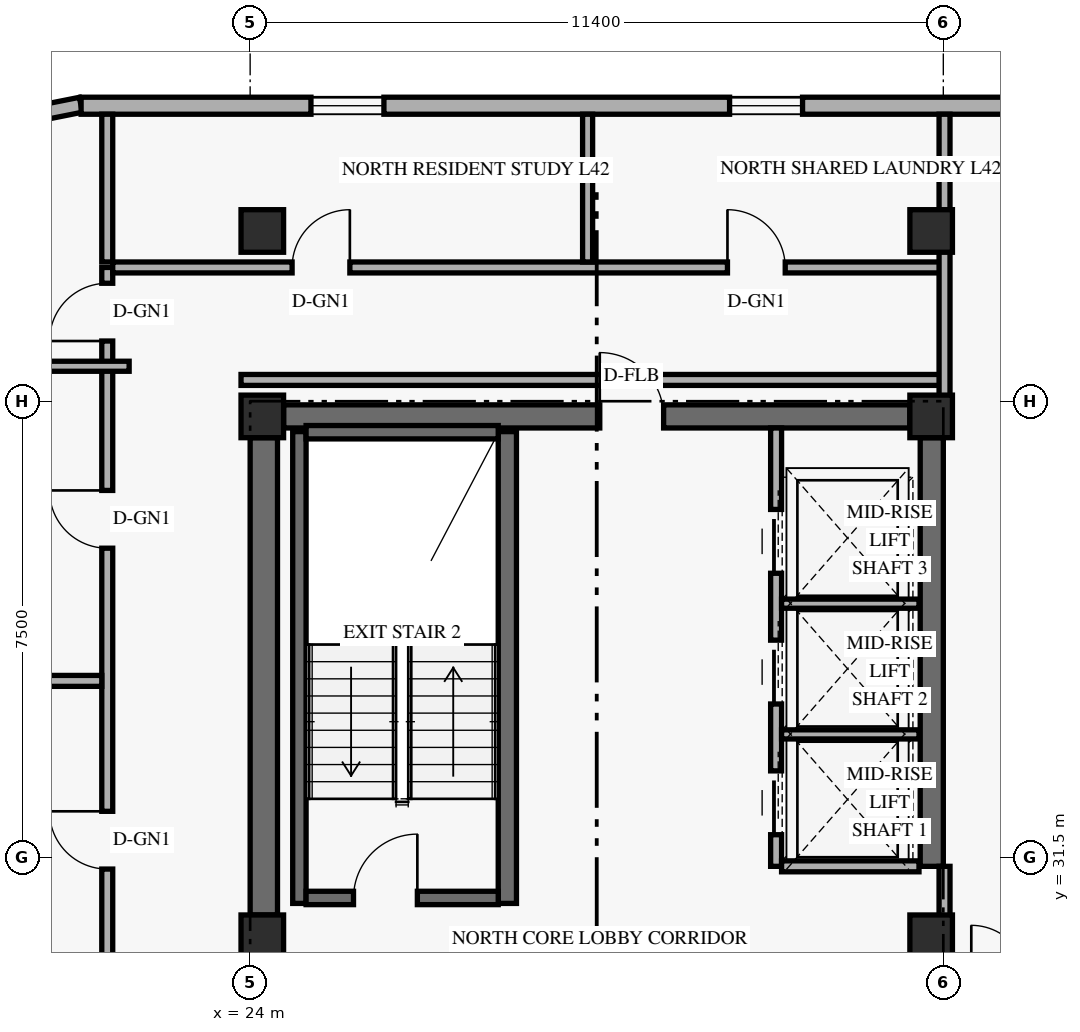
"""IFC4 building model, lengths in metres.
Left out: names, types, materials, properties, quantities, classifications, styles, units other than length and angle.
Written with IfcOpenShell. Run it as: python <this file> out.ifc"""

import sys

from ifc_helpers import new_model, si_unit, direction, frame, frame_2d, origin, origin_2d, place, context, subcontext, project, spatial, rectangle, extrude, element, fill, save


model = new_model("IFC4")
c1 = context("Model", 3, precision=1e-05, world=origin(), true_north=direction((0.0, 1.0)))
c2 = subcontext(c1, "Body", "Model", "MODEL_VIEW")
j1 = project(units=[si_unit("LENGTHUNIT", "METRE"), si_unit("PLANEANGLEUNIT", "RADIAN")], contexts=[c1])
p1 = place(None, origin())
s1 = spatial("IfcSite", under=j1, at=p1, CompositionType="ELEMENT")
p2 = place(p1, origin())
s2 = spatial("IfcBuilding", under=s1, at=p2, CompositionType="ELEMENT")
p3 = place(p2, frame((0.0, 0.0, 162.6)))
s3 = spatial("IfcBuildingStorey", under=s2, at=p3, CompositionType="ELEMENT", Elevation=162.6)
p4 = place(p3, frame((24.225, 30.55, 0.0), z_axis=(0.0, 0.0, 1.0), x_axis=(0.0, 1.0, 0.0)))
e1 = element("IfcWall", 1, at=p4, inside=s3, PredefinedType="SHEAR", context=c2, shape_type="SweptSolid", body=[
    extrude(rectangle(XDim=7.85, YDim=0.45, at=frame_2d((3.925, 0.0))), origin(), (0.0, 0.0, 1.0), 2.748),
])
p5 = place(p3, frame((35.21, 31.35, 0.0), z_axis=(0.0, 0.0, 1.0), x_axis=(0.0, 1.0, 0.0)))
e2 = element("IfcWall", 2, at=p5, inside=s3, PredefinedType="SHEAR", context=c2, shape_type="SweptSolid", body=[
    extrude(rectangle(XDim=7.05, YDim=0.38, at=frame_2d((3.525, 0.0))), origin(), (0.0, 0.0, 1.0), 2.748),
])
p6 = place(p3, frame((24.55, 38.75, 0.0), z_axis=(0.0, 0.0, 1.0), x_axis=(1.0, 0.0, 0.0)))
e3 = element("IfcWall", 3, at=p6, inside=s3, PredefinedType="SHEAR", context=c2, shape_type="SweptSolid", body=[
    extrude(rectangle(XDim=10.3, YDim=0.38, at=frame_2d((5.15, 0.0))), origin(), (0.0, 0.0, 1.0), 3.36),
])
p7 = place(p6, frame((5.2, 0.0, 0.0)))
e4 = element("IfcOpeningElement", 4, at=p7, cuts=e3, PredefinedType="OPENING", context=c2, shape_type="SweptSolid", body=[
    extrude(rectangle(XDim=1.05, YDim=2.15, at=frame_2d((0.525, 1.075))), frame((0.0, 0.2, 0.0), z_axis=(0.0, -1.0, 0.0), x_axis=(1.0, 0.0, 0.0)), (0.0, 0.0, 1.0), 0.4),
])
p8 = place(p3, frame((24.81, 30.74, 0.0), z_axis=(0.0, 0.0, 1.0), x_axis=(0.0, 1.0, 0.0)))
e5 = element("IfcWall", 5, at=p8, inside=s3, PredefinedType="SHEAR", context=c2, shape_type="SweptSolid", body=[
    extrude(rectangle(XDim=7.76, YDim=0.22, at=frame_2d((3.88, 0.0))), origin(), (0.0, 0.0, 1.0), 3.36),
])
p9 = place(p3, frame((28.23, 30.74, 0.0), z_axis=(0.0, 0.0, 1.0), x_axis=(0.0, 1.0, 0.0)))
e6 = element("IfcWall", 6, at=p9, inside=s3, PredefinedType="SHEAR", context=c2, shape_type="SweptSolid", body=[
    extrude(rectangle(XDim=7.76, YDim=0.3, at=frame_2d((3.88, 0.0))), origin(), (0.0, 0.0, 1.0), 3.36),
])
p10 = place(p3, frame((24.92, 30.83, 0.0), z_axis=(0.0, 0.0, 1.0), x_axis=(1.0, 0.0, 0.0)))
e7 = element("IfcWall", 7, at=p10, inside=s3, PredefinedType="SHEAR", context=c2, shape_type="SweptSolid", body=[
    extrude(rectangle(XDim=3.16, YDim=0.22, at=frame_2d((1.58, 0.0))), origin(), (0.0, 0.0, 1.0), 3.36),
])
p11 = place(p10, frame((0.78, 0.0, 0.0)))
e8 = element("IfcOpeningElement", 8, at=p11, cuts=e7, PredefinedType="OPENING", context=c2, shape_type="SweptSolid", body=[
    extrude(rectangle(XDim=1.05, YDim=2.15, at=frame_2d((0.525, 1.075))), frame((0.0, 0.12, 0.0), z_axis=(0.0, -1.0, 0.0), x_axis=(1.0, 0.0, 0.0)), (0.0, 0.0, 1.0), 0.24),
])
p12 = place(p3, frame((24.92, 38.49, 0.0), z_axis=(0.0, 0.0, 1.0), x_axis=(1.0, 0.0, 0.0)))
e9 = element("IfcWall", 9, at=p12, inside=s3, PredefinedType="SHEAR", context=c2, shape_type="SweptSolid", body=[
    extrude(rectangle(XDim=3.16, YDim=0.22, at=frame_2d((1.58, 0.0))), origin(), (0.0, 0.0, 1.0), 3.36),
])
for number, where, z_axis, x_axis in (
    (10, (24.2, 30.2, 0.0), (0.0, 0.0, 1.0), (1.0, 0.0, 0.0)),
    (11, (24.2, 38.75, 0.0), (0.0, 0.0, 1.0), (1.0, 0.0, 0.0)),
    (12, (24.2, 41.8, 0.0), (0.0, 0.0, 1.0), (1.0, 0.0, 0.0)),
    (13, (35.2, 30.2, 0.0), (0.0, 0.0, 1.0), (1.0, 0.0, 0.0)),
    (14, (35.2, 38.75, 0.0), (0.0, 0.0, 1.0), (1.0, 0.0, 0.0)),
    (15, (35.2, 41.8, 0.0), (0.0, 0.0, 1.0), (1.0, 0.0, 0.0)),
):
    element("IfcColumn", number, at=place(p3, frame(where, z_axis=z_axis, x_axis=x_axis)), inside=s3, PredefinedType="COLUMN", context=c2, shape_type="SweptSolid", body=[
        extrude(rectangle(XDim=0.7, YDim=0.7, at=origin_2d()), origin(), (0.0, 0.0, 1.0), 3.6),
    ])
p13 = place(p3, frame((21.217, 43.876, 0.0), z_axis=(0.0, 0.0, 1.0), x_axis=(-0.980809899341, -0.19496651342, 0.0)))
e16 = element("IfcWall", 16, at=p13, inside=s3, PredefinedType="SOLIDWALL", context=c2, shape_type="SweptSolid", body=[
    extrude(rectangle(XDim=1.389, YDim=0.25, at=frame_2d((0.694, 0.0))), origin(), (0.0, 0.0, 1.0), 3.36),
])
p14 = place(p3, frame((54.98, 43.86, 0.0), z_axis=(0.0, 0.0, 1.0), x_axis=(-1.0, 0.0, 0.0)))
e17 = element("IfcWall", 17, at=p14, inside=s3, PredefinedType="SOLIDWALL", context=c2, shape_type="SweptSolid", body=[
    extrude(rectangle(XDim=33.76, YDim=0.28, at=frame_2d((16.88, 0.0))), origin(), (0.0, 0.0, 1.0), 3.36),
])
p15 = place(p14, frame((28.78, 0.0, 0.85)))
e18 = element("IfcOpeningElement", 18, at=p15, cuts=e17, PredefinedType="OPENING", context=c2, shape_type="SweptSolid", body=[
    extrude(rectangle(XDim=1.2, YDim=1.5, at=frame_2d((0.6, 0.75))), frame((0.0, 0.15, 0.0), z_axis=(0.0, -1.0, 0.0), x_axis=(1.0, 0.0, 0.0)), (0.0, 0.0, 1.0), 0.3),
])
p16 = place(p14, frame((21.895, 0.0, 0.85)))
e19 = element("IfcOpeningElement", 19, at=p16, cuts=e17, PredefinedType="OPENING", context=c2, shape_type="SweptSolid", body=[
    extrude(rectangle(XDim=1.2, YDim=1.5, at=frame_2d((0.6, 0.75))), frame((0.0, 0.15, 0.0), z_axis=(0.0, -1.0, 0.0), x_axis=(1.0, 0.0, 0.0)), (0.0, 0.0, 1.0), 0.3),
])
p17 = place(p14, frame((15.221, 0.0, 0.85)))
e20 = element("IfcOpeningElement", 20, at=p17, cuts=e17, PredefinedType="OPENING", context=c2, shape_type="SweptSolid", body=[
    extrude(rectangle(XDim=1.2, YDim=1.5, at=frame_2d((0.6, 0.75))), frame((0.0, 0.15, 0.0), z_axis=(0.0, -1.0, 0.0), x_axis=(1.0, 0.0, 0.0)), (0.0, 0.0, 1.0), 0.3),
])
p18 = place(p14, frame((8.031, 0.0, 0.85)))
e21 = element("IfcOpeningElement", 21, at=p18, cuts=e17, PredefinedType="OPENING", context=c2, shape_type="SweptSolid", body=[
    extrude(rectangle(XDim=1.2, YDim=1.5, at=frame_2d((0.6, 0.75))), frame((0.0, 0.15, 0.0), z_axis=(0.0, -1.0, 0.0), x_axis=(1.0, 0.0, 0.0)), (0.0, 0.0, 1.0), 0.3),
])
p19 = place(p14, frame((1.99, 0.0, 0.85)))
e22 = element("IfcOpeningElement", 22, at=p19, cuts=e17, PredefinedType="OPENING", context=c2, shape_type="SweptSolid", body=[
    extrude(rectangle(XDim=1.2, YDim=1.5, at=frame_2d((0.6, 0.75))), frame((0.0, 0.15, 0.0), z_axis=(0.0, -1.0, 0.0), x_axis=(1.0, 0.0, 0.0)), (0.0, 0.0, 1.0), 0.3),
])
p20 = place(p3, frame((32.65, 31.35, 0.0), z_axis=(0.0, 0.0, 1.0), x_axis=(0.0, 1.0, 0.0)))
e23 = element("IfcWall", 23, at=p20, inside=s3, PredefinedType="STANDARD", context=c2, shape_type="SweptSolid", body=[
    extrude(rectangle(XDim=7.21, YDim=0.18, at=frame_2d((3.605, 0.0))), origin(), (0.0, 0.0, 1.0), 3.36),
])
p21 = place(p20, frame((0.52, 0.0, 0.0)))
e24 = element("IfcOpeningElement", 24, at=p21, cuts=e23, PredefinedType="OPENING", context=c2, shape_type="SweptSolid", body=[
    extrude(rectangle(XDim=1.05, YDim=2.2, at=frame_2d((0.525, 1.1))), frame((0.0, 0.1, 0.0), z_axis=(0.0, -1.0, 0.0), x_axis=(1.0, 0.0, 0.0)), (0.0, 0.0, 1.0), 0.2),
])
p22 = place(p20, frame((2.67, 0.0, 0.0)))
e25 = element("IfcOpeningElement", 25, at=p22, cuts=e23, PredefinedType="OPENING", context=c2, shape_type="SweptSolid", body=[
    extrude(rectangle(XDim=1.05, YDim=2.2, at=frame_2d((0.525, 1.1))), frame((0.0, 0.1, 0.0), z_axis=(0.0, -1.0, 0.0), x_axis=(1.0, 0.0, 0.0)), (0.0, 0.0, 1.0), 0.2),
])
p23 = place(p20, frame((4.82, 0.0, 0.0)))
e26 = element("IfcOpeningElement", 26, at=p23, cuts=e23, PredefinedType="OPENING", context=c2, shape_type="SweptSolid", body=[
    extrude(rectangle(XDim=1.05, YDim=2.2, at=frame_2d((0.525, 1.1))), frame((0.0, 0.1, 0.0), z_axis=(0.0, -1.0, 0.0), x_axis=(1.0, 0.0, 0.0)), (0.0, 0.0, 1.0), 0.2),
])
p24 = place(p3, frame((32.74, 31.35, 0.0), z_axis=(0.0, 0.0, 1.0), x_axis=(1.0, 0.0, 0.0)))
e27 = element("IfcWall", 27, at=p24, inside=s3, PredefinedType="STANDARD", context=c2, shape_type="SweptSolid", body=[
    extrude(rectangle(XDim=2.26, YDim=0.18, at=frame_2d((1.13, 0.0))), origin(), (0.0, 0.0, 1.0), 3.36),
])
for number, where, z_axis, x_axis in (
    (28, (32.74, 33.52, 0.0), (0.0, 0.0, 1.0), (1.0, 0.0, 0.0)),
    (29, (32.74, 35.67, 0.0), (0.0, 0.0, 1.0), (1.0, 0.0, 0.0)),
):
    element("IfcWall", number, at=place(p3, frame(where, z_axis=z_axis, x_axis=x_axis)), inside=s3, PredefinedType="STANDARD", context=c2, shape_type="SweptSolid", body=[
        extrude(rectangle(XDim=2.26, YDim=0.15, at=frame_2d((1.13, 0.0))), origin(), (0.0, 0.0, 1.0), 3.36),
    ])
p25 = place(p3, frame((35.42, 29.46, 0.0), z_axis=(0.0, 0.0, 1.0), x_axis=(0.0, 1.0, 0.0)))
e30 = element("IfcWall", 30, at=p25, inside=s3, PredefinedType="STANDARD", context=c2, shape_type="SweptSolid", body=[
    extrude(rectangle(XDim=1.89, YDim=0.18, at=frame_2d((0.945, 0.0))), origin(), (0.0, 0.0, 1.0), 2.73),
])
p26 = place(p3, frame((21.65, 6.8, 0.0), z_axis=(0.0, 0.0, 1.0), x_axis=(0.0, 1.0, 0.0)))
e31 = element("IfcWall", 31, at=p26, inside=s3, PredefinedType="STANDARD", context=c2, shape_type="SweptSolid", body=[
    extrude(rectangle(XDim=34.4, YDim=0.18, at=frame_2d((17.2, 0.0))), origin(), (0.0, 0.0, 1.0), 2.73),
])
p27 = place(p26, frame((0.3, 0.0, 0.0)))
e32 = element("IfcOpeningElement", 32, at=p27, cuts=e31, PredefinedType="OPENING", context=c2, shape_type="SweptSolid", body=[
    extrude(rectangle(XDim=0.95, YDim=2.15, at=frame_2d((0.475, 1.075))), frame((0.0, 0.1, 0.0), z_axis=(0.0, -1.0, 0.0), x_axis=(1.0, 0.0, 0.0)), (0.0, 0.0, 1.0), 0.2),
])
p28 = place(p26, frame((4.167, 0.0, 0.0)))
e33 = element("IfcOpeningElement", 33, at=p28, cuts=e31, PredefinedType="OPENING", context=c2, shape_type="SweptSolid", body=[
    extrude(rectangle(XDim=0.95, YDim=2.15, at=frame_2d((0.475, 1.075))), frame((0.0, 0.1, 0.0), z_axis=(0.0, -1.0, 0.0), x_axis=(1.0, 0.0, 0.0)), (0.0, 0.0, 1.0), 0.2),
])
p29 = place(p26, frame((8.77, 0.0, 0.0)))
e34 = element("IfcOpeningElement", 34, at=p29, cuts=e31, PredefinedType="OPENING", context=c2, shape_type="SweptSolid", body=[
    extrude(rectangle(XDim=0.95, YDim=2.15, at=frame_2d((0.475, 1.075))), frame((0.0, 0.1, 0.0), z_axis=(0.0, -1.0, 0.0), x_axis=(1.0, 0.0, 0.0)), (0.0, 0.0, 1.0), 0.2),
])
p30 = place(p26, frame((13.88, 0.0, 0.0)))
e35 = element("IfcOpeningElement", 35, at=p30, cuts=e31, PredefinedType="OPENING", context=c2, shape_type="SweptSolid", body=[
    extrude(rectangle(XDim=0.95, YDim=2.15, at=frame_2d((0.475, 1.075))), frame((0.0, 0.1, 0.0), z_axis=(0.0, -1.0, 0.0), x_axis=(1.0, 0.0, 0.0)), (0.0, 0.0, 1.0), 0.2),
])
p31 = place(p26, frame((19.395, 0.0, 0.0)))
e36 = element("IfcOpeningElement", 36, at=p31, cuts=e31, PredefinedType="OPENING", context=c2, shape_type="SweptSolid", body=[
    extrude(rectangle(XDim=0.95, YDim=2.15, at=frame_2d((0.475, 1.075))), frame((0.0, 0.1, 0.0), z_axis=(0.0, -1.0, 0.0), x_axis=(1.0, 0.0, 0.0)), (0.0, 0.0, 1.0), 0.2),
])
p32 = place(p26, frame((24.505, 0.0, 0.0)))
e37 = element("IfcOpeningElement", 37, at=p32, cuts=e31, PredefinedType="OPENING", context=c2, shape_type="SweptSolid", body=[
    extrude(rectangle(XDim=0.95, YDim=2.15, at=frame_2d((0.475, 1.075))), frame((0.0, 0.1, 0.0), z_axis=(0.0, -1.0, 0.0), x_axis=(1.0, 0.0, 0.0)), (0.0, 0.0, 1.0), 0.2),
])
p33 = place(p26, frame((29.782, 0.0, 0.0)))
e38 = element("IfcOpeningElement", 38, at=p33, cuts=e31, PredefinedType="OPENING", context=c2, shape_type="SweptSolid", body=[
    extrude(rectangle(XDim=0.95, YDim=2.15, at=frame_2d((0.475, 1.075))), frame((0.0, 0.1, 0.0), z_axis=(0.0, -1.0, 0.0), x_axis=(1.0, 0.0, 0.0)), (0.0, 0.0, 1.0), 0.2),
])
p34 = place(p26, frame((33.19, 0.0, 0.0)))
e39 = element("IfcOpeningElement", 39, at=p34, cuts=e31, PredefinedType="OPENING", context=c2, shape_type="SweptSolid", body=[
    extrude(rectangle(XDim=0.95, YDim=2.15, at=frame_2d((0.475, 1.075))), frame((0.0, 0.1, 0.0), z_axis=(0.0, -1.0, 0.0), x_axis=(1.0, 0.0, 0.0)), (0.0, 0.0, 1.0), 0.2),
])
p35 = place(p3, frame((21.74, 41.2, 0.0), z_axis=(0.0, 0.0, 1.0), x_axis=(1.0, 0.0, 0.0)))
e40 = element("IfcWall", 40, at=p35, inside=s3, PredefinedType="STANDARD", context=c2, shape_type="SweptSolid", body=[
    extrude(rectangle(XDim=13.68, YDim=0.18, at=frame_2d((6.84, 0.0))), origin(), (0.0, 0.0, 1.0), 2.73),
])
p36 = place(p35, frame((2.95, 0.0, 0.0)))
e41 = element("IfcOpeningElement", 41, at=p36, cuts=e40, PredefinedType="OPENING", context=c2, shape_type="SweptSolid", body=[
    extrude(rectangle(XDim=0.95, YDim=2.15, at=frame_2d((0.475, 1.075))), frame((0.0, 0.1, 0.0), z_axis=(0.0, -1.0, 0.0), x_axis=(1.0, 0.0, 0.0)), (0.0, 0.0, 1.0), 0.2),
])
p37 = place(p35, frame((10.11, 0.0, 0.0)))
e42 = element("IfcOpeningElement", 42, at=p37, cuts=e40, PredefinedType="OPENING", context=c2, shape_type="SweptSolid", body=[
    extrude(rectangle(XDim=0.95, YDim=2.15, at=frame_2d((0.475, 1.075))), frame((0.0, 0.1, 0.0), z_axis=(0.0, -1.0, 0.0), x_axis=(1.0, 0.0, 0.0)), (0.0, 0.0, 1.0), 0.2),
])
p38 = place(p3, frame((23.85, 39.35, 0.0), z_axis=(0.0, 0.0, 1.0), x_axis=(1.0, 0.0, 0.0)))
e43 = element("IfcWall", 43, at=p38, inside=s3, PredefinedType="STANDARD", context=c2, shape_type="SweptSolid", body=[
    extrude(rectangle(XDim=11.57, YDim=0.18, at=frame_2d((5.785, 0.0))), origin(), (0.0, 0.0, 1.0), 2.73),
])
p39 = place(p3, frame((21.65, 41.29, 0.0), z_axis=(0.0, 0.0, 1.0), x_axis=(0.0, 1.0, 0.0)))
e44 = element("IfcWall", 44, at=p39, inside=s3, PredefinedType="PARTITIONING", context=c2, shape_type="SweptSolid", body=[
    extrude(rectangle(XDim=2.43, YDim=0.18, at=frame_2d((1.215, 0.0))), origin(), (0.0, 0.0, 1.0), 2.879),
])
p40 = place(p3, frame((35.42, 38.75, 0.0), z_axis=(0.0, 0.0, 1.0), x_axis=(0.0, 1.0, 0.0)))
e45 = element("IfcWall", 45, at=p40, inside=s3, PredefinedType="PARTITIONING", context=c2, shape_type="SweptSolid", body=[
    extrude(rectangle(XDim=4.97, YDim=0.18, at=frame_2d((2.485, 0.0))), origin(), (0.0, 0.0, 1.0), 2.73),
])
p41 = place(p3, frame((17.88, 34.4, 0.0), z_axis=(0.0, 0.0, 1.0), x_axis=(1.0, 0.0, 0.0)))
e46 = element("IfcWall", 46, at=p41, inside=s3, PredefinedType="PARTITIONING", context=c2, shape_type="SweptSolid", body=[
    extrude(rectangle(XDim=3.68, YDim=0.18, at=frame_2d((1.84, 0.0))), origin(), (0.0, 0.0, 1.0), 2.879),
])
p42 = place(p3, frame((17.88, 39.575, 0.0), z_axis=(0.0, 0.0, 1.0), x_axis=(1.0, 0.0, 0.0)))
e47 = element("IfcWall", 47, at=p42, inside=s3, PredefinedType="PARTITIONING", context=c2, shape_type="SweptSolid", body=[
    extrude(rectangle(XDim=4.13, YDim=0.165, at=frame_2d((2.065, 0.0))), origin(), (0.0, 0.0, 1.0), 2.879),
])
p43 = place(p3, frame((29.55, 41.29, 0.0), z_axis=(0.0, 0.0, 1.0), x_axis=(0.0, 1.0, 0.0)))
e48 = element("IfcWall", 48, at=p43, inside=s3, PredefinedType="PARTITIONING", context=c2, shape_type="SweptSolid", body=[
    extrude(rectangle(XDim=2.43, YDim=0.165, at=frame_2d((1.215, 0.0))), origin(), (0.0, 0.0, 1.0), 2.879),
])
p44 = place(p15, origin())
e49 = element("IfcWindow", 49, at=p44, inside=s3, PartitioningType="SINGLE_PANEL", PredefinedType="WINDOW", context=c2, shape_type="SweptSolid", body=[
    extrude(rectangle(XDim=1.2, YDim=1.5, at=frame_2d((0.6, 0.75))), frame((0.0, 0.03, 0.0), z_axis=(0.0, -1.0, 0.0), x_axis=(1.0, 0.0, 0.0)), (0.0, 0.0, 1.0), 0.06),
])
fill(e18, e49)
p45 = place(p16, origin())
e50 = element("IfcWindow", 50, at=p45, inside=s3, PartitioningType="SINGLE_PANEL", PredefinedType="WINDOW", context=c2, shape_type="SweptSolid", body=[
    extrude(rectangle(XDim=1.2, YDim=1.5, at=frame_2d((0.6, 0.75))), frame((0.0, 0.03, 0.0), z_axis=(0.0, -1.0, 0.0), x_axis=(1.0, 0.0, 0.0)), (0.0, 0.0, 1.0), 0.06),
])
fill(e19, e50)
p46 = place(p11, origin())
e51 = element("IfcDoor", 51, at=p46, inside=s3, OperationType="SINGLE_SWING_RIGHT", PredefinedType="DOOR", context=c2, shape_type="SweptSolid", body=[
    extrude(rectangle(XDim=1.05, YDim=2.15, at=frame_2d((0.525, 1.075))), frame((0.0, 0.025, 0.0), z_axis=(0.0, -1.0, 0.0), x_axis=(1.0, 0.0, 0.0)), (0.0, 0.0, 1.0), 0.05),
])
fill(e8, e51)
p47 = place(p21, origin())
e52 = element("IfcDoor", 52, at=p47, inside=s3, OperationType="SLIDING_TO_LEFT", PredefinedType="DOOR", context=c2, shape_type="SweptSolid", body=[
    extrude(rectangle(XDim=1.05, YDim=2.2, at=frame_2d((0.525, 1.1))), frame((0.0, 0.025, 0.0), z_axis=(0.0, -1.0, 0.0), x_axis=(1.0, 0.0, 0.0)), (0.0, 0.0, 1.0), 0.05),
])
fill(e24, e52)
p48 = place(p22, origin())
e53 = element("IfcDoor", 53, at=p48, inside=s3, OperationType="SLIDING_TO_LEFT", PredefinedType="DOOR", context=c2, shape_type="SweptSolid", body=[
    extrude(rectangle(XDim=1.05, YDim=2.2, at=frame_2d((0.525, 1.1))), frame((0.0, 0.025, 0.0), z_axis=(0.0, -1.0, 0.0), x_axis=(1.0, 0.0, 0.0)), (0.0, 0.0, 1.0), 0.05),
])
fill(e25, e53)
p49 = place(p23, origin())
e54 = element("IfcDoor", 54, at=p49, inside=s3, OperationType="SLIDING_TO_LEFT", PredefinedType="DOOR", context=c2, shape_type="SweptSolid", body=[
    extrude(rectangle(XDim=1.05, YDim=2.2, at=frame_2d((0.525, 1.1))), frame((0.0, 0.025, 0.0), z_axis=(0.0, -1.0, 0.0), x_axis=(1.0, 0.0, 0.0)), (0.0, 0.0, 1.0), 0.05),
])
fill(e26, e54)
p50 = place(p7, frame((1.05, 0.0, 0.0), z_axis=(0.0, 0.0, 1.0), x_axis=(-1.0, 0.0, 0.0)))
e55 = element("IfcDoor", 55, at=p50, inside=s3, OperationType="SINGLE_SWING_RIGHT", PredefinedType="DOOR", context=c2, shape_type="SweptSolid", body=[
    extrude(rectangle(XDim=1.05, YDim=2.15, at=frame_2d((0.525, 1.075))), frame((0.0, 0.025, 0.0), z_axis=(0.0, -1.0, 0.0), x_axis=(1.0, 0.0, 0.0)), (0.0, 0.0, 1.0), 0.05),
])
fill(e4, e55)
p51 = place(p32, origin())
e56 = element("IfcDoor", 56, at=p51, inside=s3, OperationType="SINGLE_SWING_RIGHT", PredefinedType="DOOR", context=c2, shape_type="SweptSolid", body=[
    extrude(rectangle(XDim=0.95, YDim=2.15, at=frame_2d((0.475, 1.075))), frame((0.0, 0.025, 0.0), z_axis=(0.0, -1.0, 0.0), x_axis=(1.0, 0.0, 0.0)), (0.0, 0.0, 1.0), 0.05),
])
fill(e37, e56)
p52 = place(p33, origin())
e57 = element("IfcDoor", 57, at=p52, inside=s3, OperationType="SINGLE_SWING_RIGHT", PredefinedType="DOOR", context=c2, shape_type="SweptSolid", body=[
    extrude(rectangle(XDim=0.95, YDim=2.15, at=frame_2d((0.475, 1.075))), frame((0.0, 0.025, 0.0), z_axis=(0.0, -1.0, 0.0), x_axis=(1.0, 0.0, 0.0)), (0.0, 0.0, 1.0), 0.05),
])
fill(e38, e57)
p53 = place(p34, origin())
e58 = element("IfcDoor", 58, at=p53, inside=s3, OperationType="SINGLE_SWING_LEFT", PredefinedType="DOOR", context=c2, shape_type="SweptSolid", body=[
    extrude(rectangle(XDim=0.95, YDim=2.15, at=frame_2d((0.475, 1.075))), frame((0.0, 0.025, 0.0), z_axis=(0.0, -1.0, 0.0), x_axis=(1.0, 0.0, 0.0)), (0.0, 0.0, 1.0), 0.05),
])
fill(e39, e58)
p54 = place(p36, origin())
e59 = element("IfcDoor", 59, at=p54, inside=s3, OperationType="SINGLE_SWING_RIGHT", PredefinedType="DOOR", context=c2, shape_type="SweptSolid", body=[
    extrude(rectangle(XDim=0.95, YDim=2.15, at=frame_2d((0.475, 1.075))), frame((0.0, 0.025, 0.0), z_axis=(0.0, -1.0, 0.0), x_axis=(1.0, 0.0, 0.0)), (0.0, 0.0, 1.0), 0.05),
])
fill(e41, e59)
p55 = place(p37, origin())
e60 = element("IfcDoor", 60, at=p55, inside=s3, OperationType="SINGLE_SWING_LEFT", PredefinedType="DOOR", context=c2, shape_type="SweptSolid", body=[
    extrude(rectangle(XDim=0.95, YDim=2.15, at=frame_2d((0.475, 1.075))), frame((0.0, 0.025, 0.0), z_axis=(0.0, -1.0, 0.0), x_axis=(1.0, 0.0, 0.0)), (0.0, 0.0, 1.0), 0.05),
])
fill(e42, e60)
save(model, sys.argv[1])
